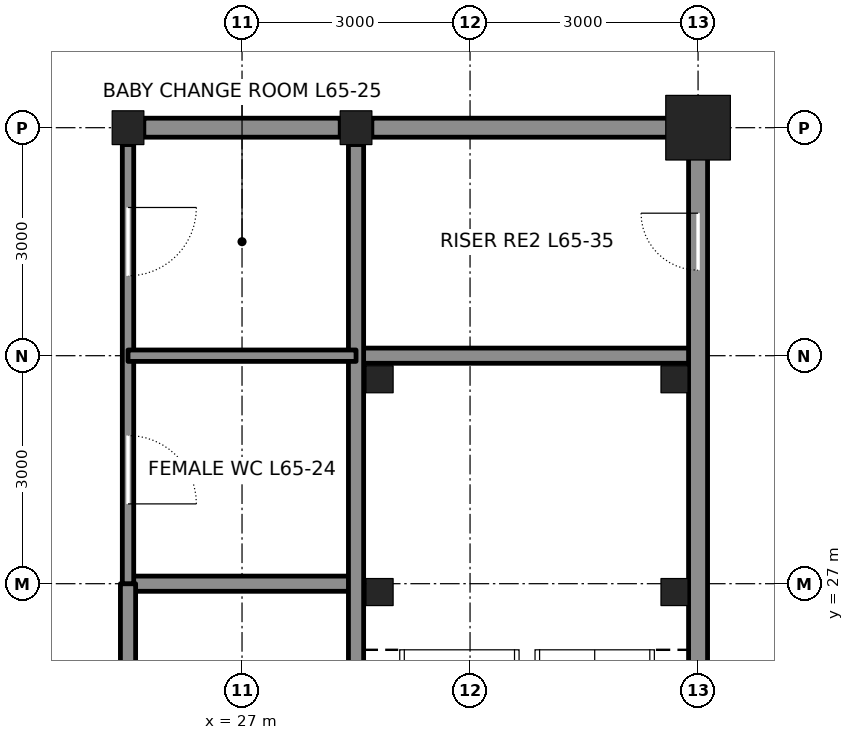
"""IFC4 building model, lengths in metres.
Left out: names, types, materials, properties, quantities, classifications, styles, units other than length and angle.
Written with IfcOpenShell. Run it as: python <this file> out.ifc"""

import sys

from ifc_helpers import new_model, si_unit, direction, frame, frame_2d, origin, origin_2d, place, context, subcontext, project, spatial, rectangle, hollow_rectangle, i_section, extrude, element, fill, save


model = new_model("IFC4")
c1 = context("Model", 3, precision=1e-05, world=origin(), true_north=direction((0.0, 1.0)))
c2 = subcontext(c1, "Body", "Model", "MODEL_VIEW")
j1 = project(units=[si_unit("LENGTHUNIT", "METRE"), si_unit("PLANEANGLEUNIT", "RADIAN")], contexts=[c1])
p1 = place(None, origin())
s1 = spatial("IfcSite", under=j1, at=p1, CompositionType="ELEMENT")
p2 = place(p1, origin())
s2 = spatial("IfcBuilding", under=s1, at=p2, CompositionType="ELEMENT")
p3 = place(p2, frame((0.0, 0.0, 291.6)))
s3 = spatial("IfcBuildingStorey", under=s2, at=p3, CompositionType="ELEMENT", Elevation=291.6)
for number, where, z_axis, x_axis in (
    (1, (25.5, 33.0, 0.0), (0.0, 0.0, 1.0), (1.0, 0.0, 0.0)),
    (2, (28.5, 33.0, 0.0), (0.0, 0.0, 1.0), (1.0, 0.0, 0.0)),
):
    element("IfcColumn", number, at=place(p3, frame(where, z_axis=z_axis, x_axis=x_axis)), inside=s3, PredefinedType="COLUMN", context=c2, shape_type="SweptSolid", body=[
        extrude(i_section(OverallWidth=0.417, OverallDepth=0.445, WebThickness=0.039, FlangeThickness=0.063, at=origin_2d()), origin(), (0.0, 0.0, 1.0), 4.2),
    ])
p4 = place(p3, frame((33.0, 33.0, 0.0), z_axis=(0.0, 0.0, 1.0), x_axis=(1.0, 0.0, 0.0)))
e3 = element("IfcColumn", 3, at=p4, inside=s3, PredefinedType="COLUMN", context=c2, shape_type="SweptSolid", body=[
    extrude(hollow_rectangle(XDim=0.85, YDim=0.85, WallThickness=0.085, at=origin_2d()), origin(), (0.0, 0.0, 1.0), 4.2),
])
p5 = place(p3, frame((25.5, 27.0, 0.0), z_axis=(0.0, 0.0, 1.0), x_axis=(1.0, 0.0, 0.0)))
e4 = element("IfcWall", 4, at=p5, inside=s3, PredefinedType="SOLIDWALL", context=c2, shape_type="SweptSolid", body=[
    extrude(rectangle(XDim=3.0, YDim=0.2, at=frame_2d((1.5, 0.0))), origin(), (0.0, 0.0, 1.0), 4.04),
])
p6 = place(p3, frame((28.5, 30.0, 0.0), z_axis=(0.0, 0.0, 1.0), x_axis=(1.0, 0.0, 0.0)))
e5 = element("IfcWall", 5, at=p6, inside=s3, PredefinedType="SOLIDWALL", context=c2, shape_type="SweptSolid", body=[
    extrude(rectangle(XDim=4.5, YDim=0.2, at=frame_2d((2.25, 0.0))), origin(), (0.0, 0.0, 1.0), 4.04),
])
p7 = place(p3, frame((25.708, 33.0, 0.0), z_axis=(0.0, 0.0, 1.0), x_axis=(1.0, 0.0, 0.0)))
e6 = element("IfcWall", 6, at=p7, inside=s3, PredefinedType="SOLIDWALL", context=c2, shape_type="SweptSolid", body=[
    extrude(rectangle(XDim=2.583, YDim=0.25, at=frame_2d((1.292, 0.0))), origin(), (0.0, 0.0, 1.0), 3.181),
])
p8 = place(p3, frame((28.708, 33.0, 0.0), z_axis=(0.0, 0.0, 1.0), x_axis=(1.0, 0.0, 0.0)))
e7 = element("IfcWall", 7, at=p8, inside=s3, PredefinedType="SOLIDWALL", context=c2, shape_type="SweptSolid", body=[
    extrude(rectangle(XDim=4.042, YDim=0.25, at=frame_2d((2.021, 0.0))), origin(), (0.0, 0.0, 1.0), 3.181),
])
p9 = place(p3, frame((25.5, 15.0, 0.0), z_axis=(0.0, 0.0, 1.0), x_axis=(0.0, 1.0, 0.0)))
e8 = element("IfcWall", 8, at=p9, inside=s3, PredefinedType="SOLIDWALL", context=c2, shape_type="SweptSolid", body=[
    extrude(rectangle(XDim=12.0, YDim=0.2, at=frame_2d((6.0, 0.0))), origin(), (0.0, 0.0, 1.0), 3.064),
])
p10 = place(p9, frame((1.8, 0.0, 0.0)))
e9 = element("IfcOpeningElement", 9, at=p10, cuts=e8, PredefinedType="OPENING", context=c2, shape_type="SweptSolid", body=[
    extrude(rectangle(XDim=0.9, YDim=2.1, at=frame_2d((0.45, 1.05))), frame((0.0, 0.11, 0.0), z_axis=(0.0, -1.0, 0.0), x_axis=(1.0, 0.0, 0.0)), (0.0, 0.0, 1.0), 0.22),
])
p11 = place(p9, frame((4.8, 0.0, 0.0)))
e10 = element("IfcOpeningElement", 10, at=p11, cuts=e8, PredefinedType="OPENING", context=c2, shape_type="SweptSolid", body=[
    extrude(rectangle(XDim=0.9, YDim=2.1, at=frame_2d((0.45, 1.05))), frame((0.0, 0.11, 0.0), z_axis=(0.0, -1.0, 0.0), x_axis=(1.0, 0.0, 0.0)), (0.0, 0.0, 1.0), 0.22),
])
p12 = place(p3, frame((25.5, 27.0, 0.0), z_axis=(0.0, 0.0, 1.0), x_axis=(0.0, 1.0, 0.0)))
e11 = element("IfcWall", 11, at=p12, inside=s3, PredefinedType="PARTITIONING", context=c2, shape_type="SweptSolid", body=[
    extrude(rectangle(XDim=5.778, YDim=0.15, at=frame_2d((2.889, 0.0))), origin(), (0.0, 0.0, 1.0), 3.064),
])
p13 = place(p12, frame((1.05, 0.0, 0.0)))
e12 = element("IfcOpeningElement", 12, at=p13, cuts=e11, PredefinedType="OPENING", context=c2, shape_type="SweptSolid", body=[
    extrude(rectangle(XDim=0.9, YDim=2.1, at=frame_2d((0.45, 1.05))), frame((0.0, 0.085, 0.0), z_axis=(0.0, -1.0, 0.0), x_axis=(1.0, 0.0, 0.0)), (0.0, 0.0, 1.0), 0.17),
])
p14 = place(p12, frame((4.05, 0.0, 0.0)))
e13 = element("IfcOpeningElement", 13, at=p14, cuts=e11, PredefinedType="OPENING", context=c2, shape_type="SweptSolid", body=[
    extrude(rectangle(XDim=0.9, YDim=2.1, at=frame_2d((0.45, 1.05))), frame((0.0, 0.085, 0.0), z_axis=(0.0, -1.0, 0.0), x_axis=(1.0, 0.0, 0.0)), (0.0, 0.0, 1.0), 0.17),
])
p15 = place(p3, frame((28.5, 24.222, 0.0), z_axis=(0.0, 0.0, 1.0), x_axis=(0.0, 1.0, 0.0)))
e14 = element("IfcWall", 14, at=p15, inside=s3, PredefinedType="SOLIDWALL", context=c2, shape_type="SweptSolid", body=[
    extrude(rectangle(XDim=8.555, YDim=0.2, at=frame_2d((4.278, 0.0))), origin(), (0.0, 0.0, 1.0), 3.113),
])
p16 = place(p3, frame((33.0, 24.222, 0.0), z_axis=(0.0, 0.0, 1.0), x_axis=(0.0, 1.0, 0.0)))
e15 = element("IfcWall", 15, at=p16, inside=s3, PredefinedType="SOLIDWALL", context=c2, shape_type="SweptSolid", body=[
    extrude(rectangle(XDim=8.528, YDim=0.25, at=frame_2d((4.264, 0.0))), origin(), (0.0, 0.0, 1.0), 3.113),
])
p17 = place(p16, frame((6.903, 0.0, 0.0)))
e16 = element("IfcOpeningElement", 16, at=p17, cuts=e15, PredefinedType="OPENING", context=c2, shape_type="SweptSolid", body=[
    extrude(rectangle(XDim=0.75, YDim=2.1, at=frame_2d((0.375, 1.05))), frame((0.0, 0.135, 0.0), z_axis=(0.0, -1.0, 0.0), x_axis=(1.0, 0.0, 0.0)), (0.0, 0.0, 1.0), 0.27),
])
p18 = place(p3, frame((25.5, 30.0, 0.0), z_axis=(0.0, 0.0, 1.0), x_axis=(1.0, 0.0, 0.0)))
e17 = element("IfcWall", 17, at=p18, inside=s3, PredefinedType="PARTITIONING", context=c2, shape_type="SweptSolid", body=[
    extrude(rectangle(XDim=3.0, YDim=0.15, at=frame_2d((1.5, 0.0))), origin(), (0.0, 0.0, 1.0), 4.04),
])
for number, where, z_axis, x_axis in (
    (18, (28.81, 29.69, 0.0), (0.0, 0.0, 1.0), (1.0, 0.0, 0.0)),
    (19, (32.69, 29.69, 0.0), (0.0, 0.0, 1.0), (1.0, 0.0, 0.0)),
    (20, (28.81, 26.89, 0.0), (0.0, 0.0, 1.0), (1.0, 0.0, 0.0)),
    (21, (32.69, 26.89, 0.0), (0.0, 0.0, 1.0), (1.0, 0.0, 0.0)),
):
    element("IfcColumn", number, at=place(p3, frame(where, z_axis=z_axis, x_axis=x_axis)), inside=s3, PredefinedType="COLUMN", context=c2, shape_type="SweptSolid", body=[
        extrude(hollow_rectangle(XDim=0.356, YDim=0.356, WallThickness=0.009, at=origin_2d()), origin(), (0.0, 0.0, 1.0), 4.2),
    ])
p19 = place(p17, origin())
e22 = element("IfcDoor", 22, at=p19, inside=s3, OperationType="SINGLE_SWING_RIGHT", PredefinedType="DOOR", context=c2, shape_type="SweptSolid", body=[
    extrude(rectangle(XDim=0.75, YDim=2.1, at=frame_2d((0.375, 1.05))), frame((0.0, 0.025, 0.0), z_axis=(0.0, -1.0, 0.0), x_axis=(1.0, 0.0, 0.0)), (0.0, 0.0, 1.0), 0.05),
])
fill(e16, e22)
p20 = place(p13, frame((0.9, 0.0, 0.0), z_axis=(0.0, 0.0, 1.0), x_axis=(-1.0, 0.0, 0.0)))
e23 = element("IfcDoor", 23, at=p20, inside=s3, OperationType="SINGLE_SWING_RIGHT", PredefinedType="DOOR", context=c2, shape_type="SweptSolid", body=[
    extrude(rectangle(XDim=0.9, YDim=2.1, at=frame_2d((0.45, 1.05))), frame((0.0, 0.025, 0.0), z_axis=(0.0, -1.0, 0.0), x_axis=(1.0, 0.0, 0.0)), (0.0, 0.0, 1.0), 0.05),
])
fill(e12, e23)
p21 = place(p14, frame((0.9, 0.0, 0.0), z_axis=(0.0, 0.0, 1.0), x_axis=(-1.0, 0.0, 0.0)))
e24 = element("IfcDoor", 24, at=p21, inside=s3, OperationType="SINGLE_SWING_LEFT", PredefinedType="DOOR", context=c2, shape_type="SweptSolid", body=[
    extrude(rectangle(XDim=0.9, YDim=2.1, at=frame_2d((0.45, 1.05))), frame((0.0, 0.025, 0.0), z_axis=(0.0, -1.0, 0.0), x_axis=(1.0, 0.0, 0.0)), (0.0, 0.0, 1.0), 0.05),
])
fill(e13, e24)
save(model, sys.argv[1])
